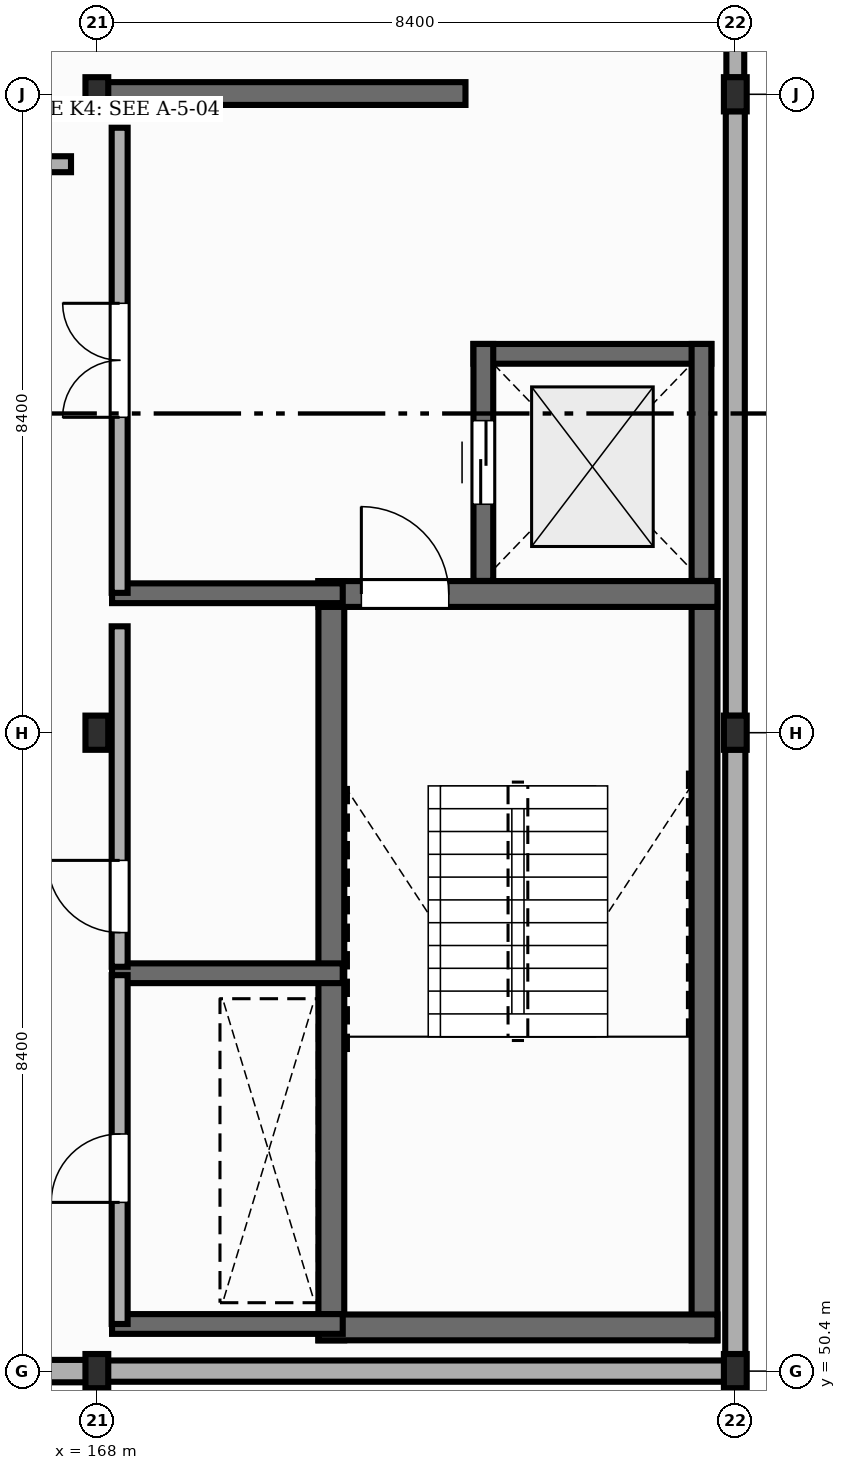
"""IFC4 building model, lengths in metres.
Left out: names, types, materials, properties, quantities, classifications, styles, units other than length and angle.
Written with IfcOpenShell. Run it as: python <this file> out.ifc"""

import sys

from ifc_helpers import new_model, si_unit, direction, frame, frame_2d, origin, origin_2d, place, context, subcontext, project, spatial, rectangle, i_section, extrude, element, fill, save


model = new_model("IFC4")
c1 = context("Model", 3, precision=1e-05, world=origin(), true_north=direction((0.0, 1.0)))
c2 = subcontext(c1, "Body", "Model", "MODEL_VIEW")
j1 = project(units=[si_unit("LENGTHUNIT", "METRE"), si_unit("PLANEANGLEUNIT", "RADIAN")], contexts=[c1])
p1 = place(None, origin())
s1 = spatial("IfcSite", under=j1, at=p1, CompositionType="ELEMENT")
p2 = place(p1, origin())
s2 = spatial("IfcBuilding", under=s1, at=p2, CompositionType="ELEMENT")
p3 = place(p2, frame((0.0, 0.0, 9.9)))
s3 = spatial("IfcBuildingStorey", under=s2, at=p3, CompositionType="ELEMENT", Elevation=9.9)
for number, where, z_axis, x_axis in (
    (1, (168.0, 50.4, 0.0), (0.0, 0.0, 1.0), (1.0, 0.0, 0.0)),
    (2, (168.0, 58.8, 0.0), (0.0, 0.0, 1.0), (1.0, 0.0, 0.0)),
    (3, (168.0, 67.2, 0.0), (0.0, 0.0, 1.0), (1.0, 0.0, 0.0)),
    (4, (176.4, 50.4, 0.0), (0.0, 0.0, 1.0), (1.0, 0.0, 0.0)),
    (5, (176.4, 58.8, 0.0), (0.0, 0.0, 1.0), (1.0, 0.0, 0.0)),
    (6, (176.4, 67.2, 0.0), (0.0, 0.0, 1.0), (1.0, 0.0, 0.0)),
):
    element("IfcColumn", number, at=place(p3, frame(where, z_axis=z_axis, x_axis=x_axis)), inside=s3, PredefinedType="COLUMN", context=c2, shape_type="SweptSolid", body=[
        extrude(i_section(OverallWidth=0.3, OverallDepth=0.45, WebThickness=0.014, FlangeThickness=0.026, FilletRadius=0.027, at=origin_2d()), origin(), (0.0, 0.0, 1.0), 4.05),
    ])
p4 = place(p3, frame((159.608, 50.4, 0.0), z_axis=(0.0, 0.0, 1.0), x_axis=(1.0, 0.0, 0.0)))
e7 = element("IfcWall", 7, at=p4, inside=s3, PredefinedType="STANDARD", context=c2, shape_type="SweptSolid", body=[
    extrude(rectangle(XDim=8.384, YDim=0.295, at=frame_2d((4.192, 0.0))), origin(), (0.0, 0.0, 1.0), 3.502),
])
p5 = place(p3, frame((168.008, 50.4, 0.0), z_axis=(0.0, 0.0, 1.0), x_axis=(1.0, 0.0, 0.0)))
e8 = element("IfcWall", 8, at=p5, inside=s3, PredefinedType="STANDARD", context=c2, shape_type="SweptSolid", body=[
    extrude(rectangle(XDim=8.384, YDim=0.28, at=frame_2d((4.192, 0.0))), origin(), (0.0, 0.0, 1.0), 3.472),
])
p6 = place(p3, frame((176.4, 50.621, 0.0), z_axis=(0.0, 0.0, 1.0), x_axis=(0.0, 1.0, 0.0)))
e9 = element("IfcWall", 9, at=p6, inside=s3, PredefinedType="STANDARD", context=c2, shape_type="SweptSolid", body=[
    extrude(rectangle(XDim=7.958, YDim=0.265, at=frame_2d((3.979, 0.0))), origin(), (0.0, 0.0, 1.0), 3.562),
])
p7 = place(p3, frame((176.4, 59.021, 0.0), z_axis=(0.0, 0.0, 1.0), x_axis=(0.0, 1.0, 0.0)))
e10 = element("IfcWall", 10, at=p7, inside=s3, PredefinedType="STANDARD", context=c2, shape_type="SweptSolid", body=[
    extrude(rectangle(XDim=7.958, YDim=0.25, at=frame_2d((3.979, 0.0))), origin(), (0.0, 0.0, 1.0), 3.472),
])
p8 = place(p3, frame((176.4, 67.421, 0.0), z_axis=(0.0, 0.0, 1.0), x_axis=(0.0, 1.0, 0.0)))
e11 = element("IfcWall", 11, at=p8, inside=s3, PredefinedType="STANDARD", context=c2, shape_type="SweptSolid", body=[
    extrude(rectangle(XDim=7.958, YDim=0.235, at=frame_2d((3.979, 0.0))), origin(), (0.0, 0.0, 1.0), 3.562),
])
for number, where, z_axis, x_axis in (
    (12, (171.085, 50.805, 0.0), (0.0, 0.0, 1.0), (0.0, 1.0, 0.0)),
    (13, (175.995, 50.805, 0.0), (0.0, 0.0, 1.0), (0.0, 1.0, 0.0)),
):
    element("IfcWall", number, at=place(p3, frame(where, z_axis=z_axis, x_axis=x_axis)), inside=s3, PredefinedType="SHEAR", context=c2, shape_type="SweptSolid", body=[
        extrude(rectangle(XDim=9.99, YDim=0.34, at=frame_2d((4.995, 0.0))), origin(), (0.0, 0.0, 1.0), 3.84),
    ])
p9 = place(p3, frame((170.915, 50.975, 0.0), z_axis=(0.0, 0.0, 1.0), x_axis=(1.0, 0.0, 0.0)))
e14 = element("IfcWall", 14, at=p9, inside=s3, PredefinedType="SHEAR", context=c2, shape_type="SweptSolid", body=[
    extrude(rectangle(XDim=5.25, YDim=0.34, at=frame_2d((2.625, 0.0))), origin(), (0.0, 0.0, 1.0), 3.84),
])
p10 = place(p3, frame((170.915, 60.625, 0.0), z_axis=(0.0, 0.0, 1.0), x_axis=(1.0, 0.0, 0.0)))
e15 = element("IfcWall", 15, at=p10, inside=s3, PredefinedType="SHEAR", context=c2, shape_type="SweptSolid", body=[
    extrude(rectangle(XDim=5.25, YDim=0.34, at=frame_2d((2.625, 0.0))), origin(), (0.0, 0.0, 1.0), 3.84),
])
p11 = place(p10, frame((0.565, 0.0, 0.0)))
e16 = element("IfcOpeningElement", 16, at=p11, cuts=e15, PredefinedType="OPENING", context=c2, shape_type="SweptSolid", body=[
    extrude(rectangle(XDim=1.15, YDim=2.15, at=frame_2d((0.575, 1.075))), frame((0.0, 0.18, 0.0), z_axis=(0.0, -1.0, 0.0), x_axis=(1.0, 0.0, 0.0)), (0.0, 0.0, 1.0), 0.36),
])
p12 = place(p3, frame((172.955, 63.785, 0.0), z_axis=(0.0, 0.0, 1.0), x_axis=(1.0, 0.0, 0.0)))
e17 = element("IfcWall", 17, at=p12, inside=s3, PredefinedType="SHEAR", context=c2, shape_type="SweptSolid", body=[
    extrude(rectangle(XDim=3.13, YDim=0.26, at=frame_2d((1.565, 0.0))), origin(), (0.0, 0.0, 1.0), 3.84),
])
p13 = place(p3, frame((175.955, 60.797, 0.0), z_axis=(0.0, 0.0, 1.0), x_axis=(0.0, 1.0, 0.0)))
e18 = element("IfcWall", 18, at=p13, inside=s3, PredefinedType="SHEAR", context=c2, shape_type="SweptSolid", body=[
    extrude(rectangle(XDim=3.118, YDim=0.26, at=frame_2d((1.559, 0.0))), origin(), (0.0, 0.0, 1.0), 3.84),
])
p14 = place(p3, frame((173.085, 60.797, 0.0), z_axis=(0.0, 0.0, 1.0), x_axis=(0.0, 1.0, 0.0)))
e19 = element("IfcWall", 19, at=p14, inside=s3, PredefinedType="SHEAR", context=c2, shape_type="SweptSolid", body=[
    extrude(rectangle(XDim=3.118, YDim=0.26, at=frame_2d((1.559, 0.0))), origin(), (0.0, 0.0, 1.0), 3.84),
])
p15 = place(p14, frame((1.009, 0.0, 0.0)))
e20 = element("IfcOpeningElement", 20, at=p15, cuts=e19, PredefinedType="OPENING", context=c2, shape_type="SweptSolid", body=[
    extrude(rectangle(XDim=1.1, YDim=2.15, at=frame_2d((0.55, 1.075))), frame((0.0, 0.14, 0.0), z_axis=(0.0, -1.0, 0.0), x_axis=(1.0, 0.0, 0.0)), (0.0, 0.0, 1.0), 0.28),
])
for number, where, z_axis, x_axis in (
    (21, (168.2, 51.02, 0.0), (0.0, 0.0, 1.0), (1.0, 0.0, 0.0)),
    (22, (168.2, 55.635, 0.0), (0.0, 0.0, 1.0), (1.0, 0.0, 0.0)),
    (23, (168.2, 60.635, 0.0), (0.0, 0.0, 1.0), (1.0, 0.0, 0.0)),
):
    element("IfcWall", number, at=place(p3, frame(where, z_axis=z_axis, x_axis=x_axis)), inside=s3, PredefinedType="SHEAR", context=c2, shape_type="SweptSolid", body=[
        extrude(rectangle(XDim=3.035, YDim=0.26, at=frame_2d((1.518, 0.0))), origin(), (0.0, 0.0, 1.0), 3.84),
    ])
p16 = place(p3, frame((167.98, 67.21, 0.0), z_axis=(0.0, 0.0, 1.0), x_axis=(1.0, 0.0, 0.0)))
e24 = element("IfcWall", 24, at=p16, inside=s3, PredefinedType="SHEAR", context=c2, shape_type="SweptSolid", body=[
    extrude(rectangle(XDim=4.87, YDim=0.3, at=frame_2d((2.435, 0.0))), origin(), (0.0, 0.0, 1.0), 3.84),
])
p17 = place(p3, frame((168.3, 51.02, 0.0), z_axis=(0.0, 0.0, 1.0), x_axis=(0.0, 1.0, 0.0)))
e25 = element("IfcWall", 25, at=p17, inside=s3, PredefinedType="STANDARD", context=c2, shape_type="SweptSolid", body=[
    extrude(rectangle(XDim=4.59, YDim=0.21, at=frame_2d((2.295, 0.0))), origin(), (0.0, 0.0, 1.0), 3.232),
])
p18 = place(p17, frame((1.6, 0.0, 0.0)))
e26 = element("IfcOpeningElement", 26, at=p18, cuts=e25, PredefinedType="OPENING", context=c2, shape_type="SweptSolid", body=[
    extrude(rectangle(XDim=0.9, YDim=2.1, at=frame_2d((0.45, 1.05))), frame((0.0, 0.115, 0.0), z_axis=(0.0, -1.0, 0.0), x_axis=(1.0, 0.0, 0.0)), (0.0, 0.0, 1.0), 0.23),
])
p19 = place(p3, frame((168.3, 55.72, 0.0), z_axis=(0.0, 0.0, 1.0), x_axis=(0.0, 1.0, 0.0)))
e27 = element("IfcWall", 27, at=p19, inside=s3, PredefinedType="STANDARD", context=c2, shape_type="SweptSolid", body=[
    extrude(rectangle(XDim=4.48, YDim=0.21, at=frame_2d((2.24, 0.0))), origin(), (0.0, 0.0, 1.0), 3.232),
])
p20 = place(p19, frame((0.45, 0.0, 0.0)))
e28 = element("IfcOpeningElement", 28, at=p20, cuts=e27, PredefinedType="OPENING", context=c2, shape_type="SweptSolid", body=[
    extrude(rectangle(XDim=0.95, YDim=2.15, at=frame_2d((0.475, 1.075))), frame((0.0, 0.115, 0.0), z_axis=(0.0, -1.0, 0.0), x_axis=(1.0, 0.0, 0.0)), (0.0, 0.0, 1.0), 0.23),
])
p21 = place(p3, frame((168.3, 60.64, 0.0), z_axis=(0.0, 0.0, 1.0), x_axis=(0.0, 1.0, 0.0)))
e29 = element("IfcWall", 29, at=p21, inside=s3, PredefinedType="STANDARD", context=c2, shape_type="SweptSolid", body=[
    extrude(rectangle(XDim=6.12, YDim=0.21, at=frame_2d((3.06, 0.0))), origin(), (0.0, 0.0, 1.0), 3.342),
])
p22 = place(p21, frame((2.31, 0.0, 0.0)))
e30 = element("IfcOpeningElement", 30, at=p22, cuts=e29, PredefinedType="OPENING", context=c2, shape_type="SweptSolid", body=[
    extrude(rectangle(XDim=1.5, YDim=2.2, at=frame_2d((0.75, 1.1))), frame((0.0, 0.115, 0.0), z_axis=(0.0, -1.0, 0.0), x_axis=(1.0, 0.0, 0.0)), (0.0, 0.0, 1.0), 0.23),
])
p23 = place(p3, frame((167.66, 66.28, -0.004), z_axis=(0.0, 0.0, 1.0), x_axis=(-1.0, 0.0, 0.0)))
e31 = element("IfcWall", 31, at=p23, inside=s3, PredefinedType="STANDARD", context=c2, shape_type="SweptSolid", body=[
    extrude(rectangle(XDim=2.56, YDim=0.21, at=frame_2d((1.28, 0.0))), origin(), (0.0, 0.0, 1.0), 3.844),
])
p24 = place(p11, origin())
e32 = element("IfcDoor", 32, at=p24, inside=s3, OperationType="SINGLE_SWING_LEFT", PredefinedType="DOOR", context=c2, shape_type="SweptSolid", body=[
    extrude(rectangle(XDim=1.15, YDim=2.15, at=frame_2d((0.575, 1.075))), frame((0.0, 0.025, 0.0), z_axis=(0.0, -1.0, 0.0), x_axis=(1.0, 0.0, 0.0)), (0.0, 0.0, 1.0), 0.05),
])
fill(e16, e32)
p25 = place(p15, origin())
e33 = element("IfcDoor", 33, at=p25, inside=s3, OperationType="DOUBLE_DOOR_SLIDING", PredefinedType="DOOR", context=c2, shape_type="SweptSolid", body=[
    extrude(rectangle(XDim=1.1, YDim=2.15, at=frame_2d((0.55, 1.075))), frame((0.0, 0.025, 0.0), z_axis=(0.0, -1.0, 0.0), x_axis=(1.0, 0.0, 0.0)), (0.0, 0.0, 1.0), 0.05),
])
fill(e20, e33)
p26 = place(p18, origin())
e34 = element("IfcDoor", 34, at=p26, inside=s3, OperationType="SINGLE_SWING_LEFT", PredefinedType="DOOR", context=c2, shape_type="SweptSolid", body=[
    extrude(rectangle(XDim=0.9, YDim=2.1, at=frame_2d((0.45, 1.05))), frame((0.0, 0.025, 0.0), z_axis=(0.0, -1.0, 0.0), x_axis=(1.0, 0.0, 0.0)), (0.0, 0.0, 1.0), 0.05),
])
fill(e26, e34)
p27 = place(p20, origin())
e35 = element("IfcDoor", 35, at=p27, inside=s3, OperationType="SINGLE_SWING_RIGHT", PredefinedType="DOOR", context=c2, shape_type="SweptSolid", body=[
    extrude(rectangle(XDim=0.95, YDim=2.15, at=frame_2d((0.475, 1.075))), frame((0.0, 0.025, 0.0), z_axis=(0.0, -1.0, 0.0), x_axis=(1.0, 0.0, 0.0)), (0.0, 0.0, 1.0), 0.05),
])
fill(e28, e35)
p28 = place(p22, origin())
e36 = element("IfcDoor", 36, at=p28, inside=s3, OperationType="DOUBLE_DOOR_SINGLE_SWING", PredefinedType="DOOR", context=c2, shape_type="SweptSolid", body=[
    extrude(rectangle(XDim=1.5, YDim=2.2, at=frame_2d((0.75, 1.1))), frame((0.0, 0.025, 0.0), z_axis=(0.0, -1.0, 0.0), x_axis=(1.0, 0.0, 0.0)), (0.0, 0.0, 1.0), 0.05),
])
fill(e30, e36)
save(model, sys.argv[1])
